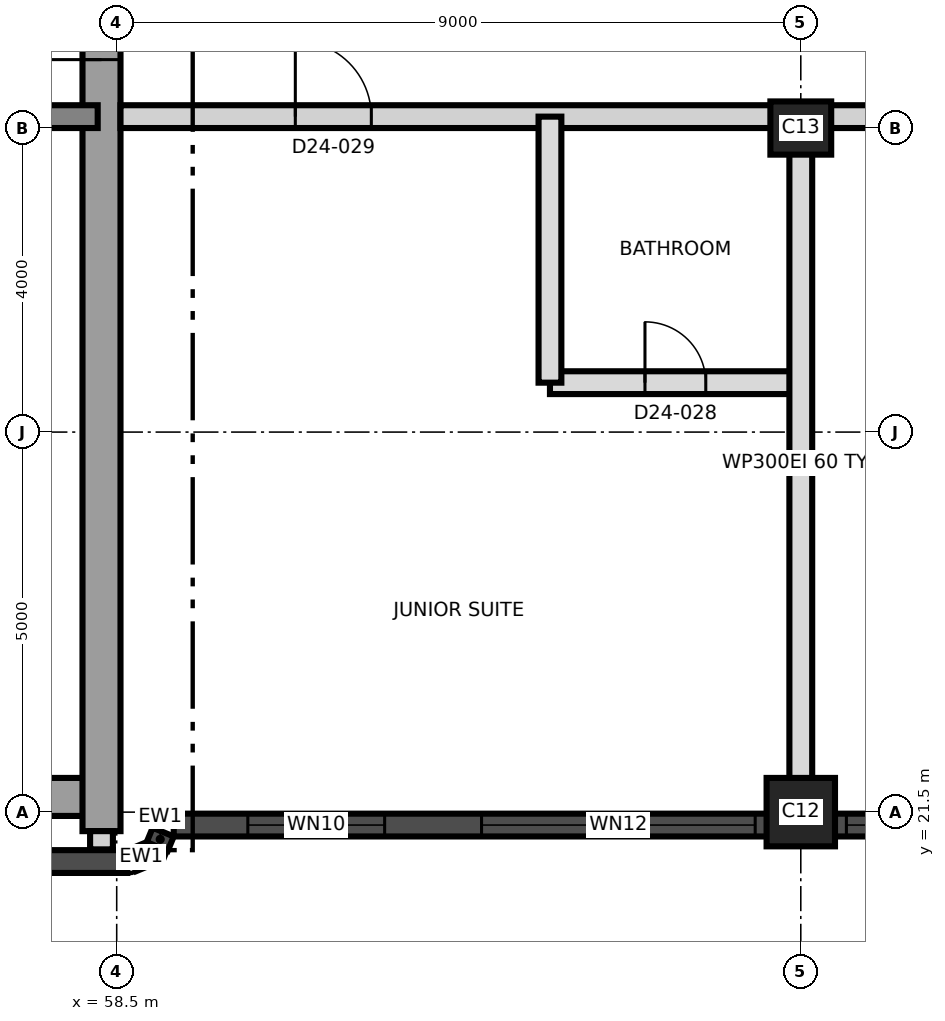
"""IFC4 building model, lengths in metres.
Left out: names, types, materials, properties, quantities, classifications, styles, units other than length and angle.
Written with IfcOpenShell. Run it as: python <this file> out.ifc"""

import sys

from ifc_helpers import new_model, si_unit, direction, frame, frame_2d, origin, origin_2d, place, context, subcontext, project, spatial, rectangle, extrude, element, fill, save


model = new_model("IFC4")
c1 = context("Model", 3, precision=1e-05, world=origin(), true_north=direction((0.0, 1.0)))
c2 = subcontext(c1, "Body", "Model", "MODEL_VIEW")
j1 = project(units=[si_unit("LENGTHUNIT", "METRE"), si_unit("PLANEANGLEUNIT", "RADIAN")], contexts=[c1])
p1 = place(None, origin())
s1 = spatial("IfcSite", under=j1, at=p1, CompositionType="ELEMENT")
p2 = place(p1, origin())
s2 = spatial("IfcBuilding", under=s1, at=p2, CompositionType="ELEMENT")
p3 = place(p2, frame((0.0, 0.0, 218.0)))
s3 = spatial("IfcBuildingStorey", under=s2, at=p3, CompositionType="ELEMENT", Elevation=218.0)
p4 = place(p3, frame((31.25, 21.7, 0.0), z_axis=(0.0, 0.0, 1.0), x_axis=(1.0, 0.0, 0.0)))
e1 = element("IfcWall", 1, at=p4, inside=s3, PredefinedType="SHEAR", context=c2, shape_type="SweptSolid", body=[
    extrude(rectangle(XDim=27.0, YDim=0.5, at=frame_2d((13.5, 0.0))), origin(), (0.0, 0.0, 1.0), 3.7),
])
p5 = place(p3, frame((58.3, 21.25, 0.0), z_axis=(0.0, 0.0, 1.0), x_axis=(0.0, 1.0, 0.0)))
e2 = element("IfcWall", 2, at=p5, inside=s3, PredefinedType="SHEAR", context=c2, shape_type="SweptSolid", body=[
    extrude(rectangle(XDim=18.5, YDim=0.5, at=frame_2d((9.25, 0.0))), origin(), (0.0, 0.0, 1.0), 3.7),
])
p6 = place(p5, frame((10.15, 0.0, 0.0)))
e3 = element("IfcOpeningElement", 3, at=p6, cuts=e2, PredefinedType="OPENING", context=c2, shape_type="SweptSolid", body=[
    extrude(rectangle(XDim=1.2, YDim=2.1, at=frame_2d((0.6, 1.05))), frame((0.0, 0.26, 0.0), z_axis=(0.0, -1.0, 0.0), x_axis=(1.0, 0.0, 0.0)), (0.0, 0.0, 1.0), 0.52),
])
p7 = place(p3, frame((31.75, 30.65, 0.0), z_axis=(0.0, 0.0, 1.0), x_axis=(1.0, 0.0, 0.0)))
e4 = element("IfcWall", 4, at=p7, inside=s3, PredefinedType="SHEAR", context=c2, shape_type="SweptSolid", body=[
    extrude(rectangle(XDim=26.5, YDim=0.3, at=frame_2d((13.25, 0.0))), origin(), (0.0, 0.0, 1.0), 3.7),
])
p8 = place(p7, frame((24.75, 0.0, 0.0)))
e5 = element("IfcOpeningElement", 5, at=p8, cuts=e4, PredefinedType="OPENING", context=c2, shape_type="SweptSolid", body=[
    extrude(rectangle(XDim=1.0, YDim=2.1, at=frame_2d((0.5, 1.05))), frame((0.0, 0.16, 0.0), z_axis=(0.0, -1.0, 0.0), x_axis=(1.0, 0.0, 0.0)), (0.0, 0.0, 1.0), 0.32),
])
p9 = place(p3, frame((67.5, 21.5, 0.0), z_axis=(0.0, 0.0, 1.0), x_axis=(1.0, 0.0, 0.0)))
e6 = element("IfcColumn", 6, at=p9, inside=s3, PredefinedType="COLUMN", context=c2, shape_type="SweptSolid", body=[
    extrude(rectangle(XDim=0.9, YDim=0.9, at=origin_2d()), origin(), (0.0, 0.0, 1.0), 3.7),
])
p10 = place(p3, frame((67.5, 30.5, 0.0), z_axis=(0.0, 0.0, 1.0), x_axis=(1.0, 0.0, 0.0)))
e7 = element("IfcColumn", 7, at=p10, inside=s3, PredefinedType="COLUMN", context=c2, shape_type="SweptSolid", body=[
    extrude(rectangle(XDim=0.8, YDim=0.7, at=origin_2d()), origin(), (0.0, 0.0, 1.0), 3.7),
])
p11 = place(p3, frame((31.36, 20.85, 0.0), z_axis=(0.0, 0.0, 1.0), x_axis=(1.0, 0.0, 0.0)))
e8 = element("IfcWall", 8, at=p11, inside=s3, PredefinedType="SOLIDWALL", context=c2, shape_type="SweptSolid", body=[
    extrude(rectangle(XDim=27.281, YDim=0.3, at=frame_2d((13.64, 0.0))), origin(), (0.0, 0.0, 1.0), 3.4),
])
p12 = place(p3, frame((58.698, 20.861, 0.0), z_axis=(0.0, 0.0, 1.0), x_axis=(0.923757413239, 0.38297812142, 0.0)))
e9 = element("IfcWall", 9, at=p12, inside=s3, PredefinedType="SOLIDWALL", context=c2, shape_type="SweptSolid", body=[
    extrude(rectangle(XDim=0.275, YDim=0.3, at=frame_2d((0.138, 0.0))), origin(), (0.0, 0.0, 1.0), 3.4),
])
p13 = place(p3, frame((59.033, 21.048, 0.0), z_axis=(0.0, 0.0, 1.0), x_axis=(0.383262727373, 0.923639367831, 0.0)))
e10 = element("IfcWall", 10, at=p13, inside=s3, PredefinedType="SOLIDWALL", context=c2, shape_type="SweptSolid", body=[
    extrude(rectangle(XDim=0.205, YDim=0.3, at=frame_2d((0.103, 0.0))), origin(), (0.0, 0.0, 1.0), 3.4),
])
p14 = place(p3, frame((59.25, 21.33, 0.0), z_axis=(0.0, 0.0, 1.0), x_axis=(1.0, 0.0, 0.0)))
e11 = element("IfcWall", 11, at=p14, inside=s3, PredefinedType="SOLIDWALL", context=c2, shape_type="SweptSolid", body=[
    extrude(rectangle(XDim=28.234, YDim=0.3, at=frame_2d((14.117, 0.0))), origin(), (0.0, 0.0, 1.0), 3.4),
])
p15 = place(p14, frame((0.975, 0.0, 0.3)))
e12 = element("IfcOpeningElement", 12, at=p15, cuts=e11, PredefinedType="OPENING", context=c2, shape_type="SweptSolid", body=[
    extrude(rectangle(XDim=1.8, YDim=2.4, at=frame_2d((0.9, 1.2))), frame((0.0, 0.16, 0.0), z_axis=(0.0, -1.0, 0.0), x_axis=(1.0, 0.0, 0.0)), (0.0, 0.0, 1.0), 0.32),
])
p16 = place(p14, frame((4.05, 0.0, 0.9)))
e13 = element("IfcOpeningElement", 13, at=p16, cuts=e11, PredefinedType="OPENING", context=c2, shape_type="SweptSolid", body=[
    extrude(rectangle(XDim=3.6, YDim=1.5, at=frame_2d((1.8, 0.75))), frame((0.0, 0.16, 0.0), z_axis=(0.0, -1.0, 0.0), x_axis=(1.0, 0.0, 0.0)), (0.0, 0.0, 1.0), 0.32),
])
p17 = place(p14, frame((8.85, 0.0, 0.9)))
e14 = element("IfcOpeningElement", 14, at=p17, cuts=e11, PredefinedType="OPENING", context=c2, shape_type="SweptSolid", body=[
    extrude(rectangle(XDim=3.6, YDim=1.5, at=frame_2d((1.8, 0.75))), frame((0.0, 0.16, 0.0), z_axis=(0.0, -1.0, 0.0), x_axis=(1.0, 0.0, 0.0)), (0.0, 0.0, 1.0), 0.32),
])
p18 = place(p14, frame((13.05, 0.0, 0.9)))
e15 = element("IfcOpeningElement", 15, at=p18, cuts=e11, PredefinedType="OPENING", context=c2, shape_type="SweptSolid", body=[
    extrude(rectangle(XDim=3.6, YDim=1.5, at=frame_2d((1.8, 0.75))), frame((0.0, 0.16, 0.0), z_axis=(0.0, -1.0, 0.0), x_axis=(1.0, 0.0, 0.0)), (0.0, 0.0, 1.0), 0.32),
])
p19 = place(p14, frame((17.85, 0.0, 0.9)))
e16 = element("IfcOpeningElement", 16, at=p19, cuts=e11, PredefinedType="OPENING", context=c2, shape_type="SweptSolid", body=[
    extrude(rectangle(XDim=3.6, YDim=1.5, at=frame_2d((1.8, 0.75))), frame((0.0, 0.16, 0.0), z_axis=(0.0, -1.0, 0.0), x_axis=(1.0, 0.0, 0.0)), (0.0, 0.0, 1.0), 0.32),
])
p20 = place(p14, frame((22.05, 0.0, 0.9)))
e17 = element("IfcOpeningElement", 17, at=p20, cuts=e11, PredefinedType="OPENING", context=c2, shape_type="SweptSolid", body=[
    extrude(rectangle(XDim=3.6, YDim=1.5, at=frame_2d((1.8, 0.75))), frame((0.0, 0.16, 0.0), z_axis=(0.0, -1.0, 0.0), x_axis=(1.0, 0.0, 0.0)), (0.0, 0.0, 1.0), 0.32),
])
p21 = place(p3, frame((64.2, 27.15, 0.0), z_axis=(0.0, 0.0, 1.0), x_axis=(1.0, 0.0, 0.0)))
e18 = element("IfcWall", 18, at=p21, inside=s3, PredefinedType="PARTITIONING", context=c2, shape_type="SweptSolid", body=[
    extrude(rectangle(XDim=3.3, YDim=0.3, at=frame_2d((1.65, 0.0))), origin(), (0.0, 0.0, 1.0), 3.4),
])
p22 = place(p21, frame((1.25, 0.0, 0.0)))
e19 = element("IfcOpeningElement", 19, at=p22, cuts=e18, PredefinedType="OPENING", context=c2, shape_type="SweptSolid", body=[
    extrude(rectangle(XDim=0.8, YDim=2.1, at=frame_2d((0.4, 1.05))), frame((0.0, 0.16, 0.0), z_axis=(0.0, -1.0, 0.0), x_axis=(1.0, 0.0, 0.0)), (0.0, 0.0, 1.0), 0.32),
])
p23 = place(p3, frame((58.55, 30.65, 0.0), z_axis=(0.0, 0.0, 1.0), x_axis=(1.0, 0.0, 0.0)))
e20 = element("IfcWall", 20, at=p23, inside=s3, PredefinedType="PARTITIONING", context=c2, shape_type="SweptSolid", body=[
    extrude(rectangle(XDim=26.78, YDim=0.3, at=frame_2d((13.39, 0.0))), origin(), (0.0, 0.0, 1.0), 3.4),
])
p24 = place(p23, frame((2.3, 0.0, 0.0)))
e21 = element("IfcOpeningElement", 21, at=p24, cuts=e20, PredefinedType="OPENING", context=c2, shape_type="SweptSolid", body=[
    extrude(rectangle(XDim=1.0, YDim=2.4, at=frame_2d((0.5, 1.2))), frame((0.0, 0.16, 0.0), z_axis=(0.0, -1.0, 0.0), x_axis=(1.0, 0.0, 0.0)), (0.0, 0.0, 1.0), 0.32),
])
p25 = place(p23, frame((10.1, 0.0, 0.0)))
e22 = element("IfcOpeningElement", 22, at=p25, cuts=e20, PredefinedType="OPENING", context=c2, shape_type="SweptSolid", body=[
    extrude(rectangle(XDim=1.0, YDim=2.1, at=frame_2d((0.5, 1.05))), frame((0.0, 0.16, 0.0), z_axis=(0.0, -1.0, 0.0), x_axis=(1.0, 0.0, 0.0)), (0.0, 0.0, 1.0), 0.32),
])
p26 = place(p23, frame((15.95, 0.0, 0.0)))
e23 = element("IfcOpeningElement", 23, at=p26, cuts=e20, PredefinedType="OPENING", context=c2, shape_type="SweptSolid", body=[
    extrude(rectangle(XDim=1.0, YDim=2.1, at=frame_2d((0.5, 1.05))), frame((0.0, 0.16, 0.0), z_axis=(0.0, -1.0, 0.0), x_axis=(1.0, 0.0, 0.0)), (0.0, 0.0, 1.0), 0.32),
])
p27 = place(p23, frame((19.085, 0.0, 0.0)))
e24 = element("IfcOpeningElement", 24, at=p27, cuts=e20, PredefinedType="OPENING", context=c2, shape_type="SweptSolid", body=[
    extrude(rectangle(XDim=1.2, YDim=2.1, at=frame_2d((0.6, 1.05))), frame((0.0, 0.16, 0.0), z_axis=(0.0, -1.0, 0.0), x_axis=(1.0, 0.0, 0.0)), (0.0, 0.0, 1.0), 0.32),
])
p28 = place(p23, frame((22.335, 0.0, 0.0)))
e25 = element("IfcOpeningElement", 25, at=p28, cuts=e20, PredefinedType="OPENING", context=c2, shape_type="SweptSolid", body=[
    extrude(rectangle(XDim=1.0, YDim=2.1, at=frame_2d((0.5, 1.05))), frame((0.0, 0.16, 0.0), z_axis=(0.0, -1.0, 0.0), x_axis=(1.0, 0.0, 0.0)), (0.0, 0.0, 1.0), 0.32),
])
p29 = place(p3, frame((64.2, 27.15, 0.0), z_axis=(0.0, 0.0, 1.0), x_axis=(0.0, 1.0, 0.0)))
e26 = element("IfcWall", 26, at=p29, inside=s3, PredefinedType="PARTITIONING", context=c2, shape_type="SweptSolid", body=[
    extrude(rectangle(XDim=3.5, YDim=0.3, at=frame_2d((1.75, 0.0))), origin(), (0.0, 0.0, 1.0), 3.4),
])
p30 = place(p3, frame((67.5, 21.53, 0.0), z_axis=(0.0, 0.0, 1.0), x_axis=(0.0, 1.0, 0.0)))
e27 = element("IfcWall", 27, at=p30, inside=s3, PredefinedType="PARTITIONING", context=c2, shape_type="SweptSolid", body=[
    extrude(rectangle(XDim=9.12, YDim=0.3, at=frame_2d((4.56, 0.0))), origin(), (0.0, 0.0, 1.0), 3.4),
])
p31 = place(p3, frame((58.3, 21.25, 0.0), z_axis=(0.0, 0.0, 1.0), x_axis=(0.0, -1.0, 0.0)))
e28 = element("IfcWall", 28, at=p31, inside=s3, PredefinedType="PARTITIONING", context=c2, shape_type="SweptSolid", body=[
    extrude(rectangle(XDim=0.24, YDim=0.3, at=frame_2d((0.12, 0.0))), origin(), (0.0, 0.0, 1.0), 3.4),
])
p32 = place(p15, origin())
e29 = element("IfcWindow", 29, at=p32, inside=s3, PartitioningType="SINGLE_PANEL", PredefinedType="WINDOW", context=c2, shape_type="SweptSolid", body=[
    extrude(rectangle(XDim=1.8, YDim=2.4, at=frame_2d((0.9, 1.2))), frame((0.0, 0.03, 0.0), z_axis=(0.0, -1.0, 0.0), x_axis=(1.0, 0.0, 0.0)), (0.0, 0.0, 1.0), 0.06),
])
fill(e12, e29)
p33 = place(p16, origin())
e30 = element("IfcWindow", 30, at=p33, inside=s3, PartitioningType="SINGLE_PANEL", PredefinedType="WINDOW", context=c2, shape_type="SweptSolid", body=[
    extrude(rectangle(XDim=3.6, YDim=1.5, at=frame_2d((1.8, 0.75))), frame((0.0, 0.03, 0.0), z_axis=(0.0, -1.0, 0.0), x_axis=(1.0, 0.0, 0.0)), (0.0, 0.0, 1.0), 0.06),
])
fill(e13, e30)
p34 = place(p17, origin())
e31 = element("IfcWindow", 31, at=p34, inside=s3, PartitioningType="SINGLE_PANEL", PredefinedType="WINDOW", context=c2, shape_type="SweptSolid", body=[
    extrude(rectangle(XDim=3.6, YDim=1.5, at=frame_2d((1.8, 0.75))), frame((0.0, 0.03, 0.0), z_axis=(0.0, -1.0, 0.0), x_axis=(1.0, 0.0, 0.0)), (0.0, 0.0, 1.0), 0.06),
])
fill(e14, e31)
p35 = place(p6, origin())
e32 = element("IfcDoor", 32, at=p35, inside=s3, OperationType="SINGLE_SWING_LEFT", PredefinedType="DOOR", context=c2, shape_type="SweptSolid", body=[
    extrude(rectangle(XDim=1.2, YDim=2.1, at=frame_2d((0.6, 1.05))), frame((0.0, 0.025, 0.0), z_axis=(0.0, -1.0, 0.0), x_axis=(1.0, 0.0, 0.0)), (0.0, 0.0, 1.0), 0.05),
])
fill(e3, e32)
p36 = place(p22, origin())
e33 = element("IfcDoor", 33, at=p36, inside=s3, OperationType="SINGLE_SWING_LEFT", PredefinedType="DOOR", context=c2, shape_type="SweptSolid", body=[
    extrude(rectangle(XDim=0.8, YDim=2.1, at=frame_2d((0.4, 1.05))), frame((0.0, 0.025, 0.0), z_axis=(0.0, -1.0, 0.0), x_axis=(1.0, 0.0, 0.0)), (0.0, 0.0, 1.0), 0.05),
])
fill(e19, e33)
p37 = place(p24, origin())
e34 = element("IfcDoor", 34, at=p37, inside=s3, OperationType="SINGLE_SWING_LEFT", PredefinedType="DOOR", context=c2, shape_type="SweptSolid", body=[
    extrude(rectangle(XDim=1.0, YDim=2.4, at=frame_2d((0.5, 1.2))), frame((0.0, 0.025, 0.0), z_axis=(0.0, -1.0, 0.0), x_axis=(1.0, 0.0, 0.0)), (0.0, 0.0, 1.0), 0.05),
])
fill(e21, e34)
save(model, sys.argv[1])
